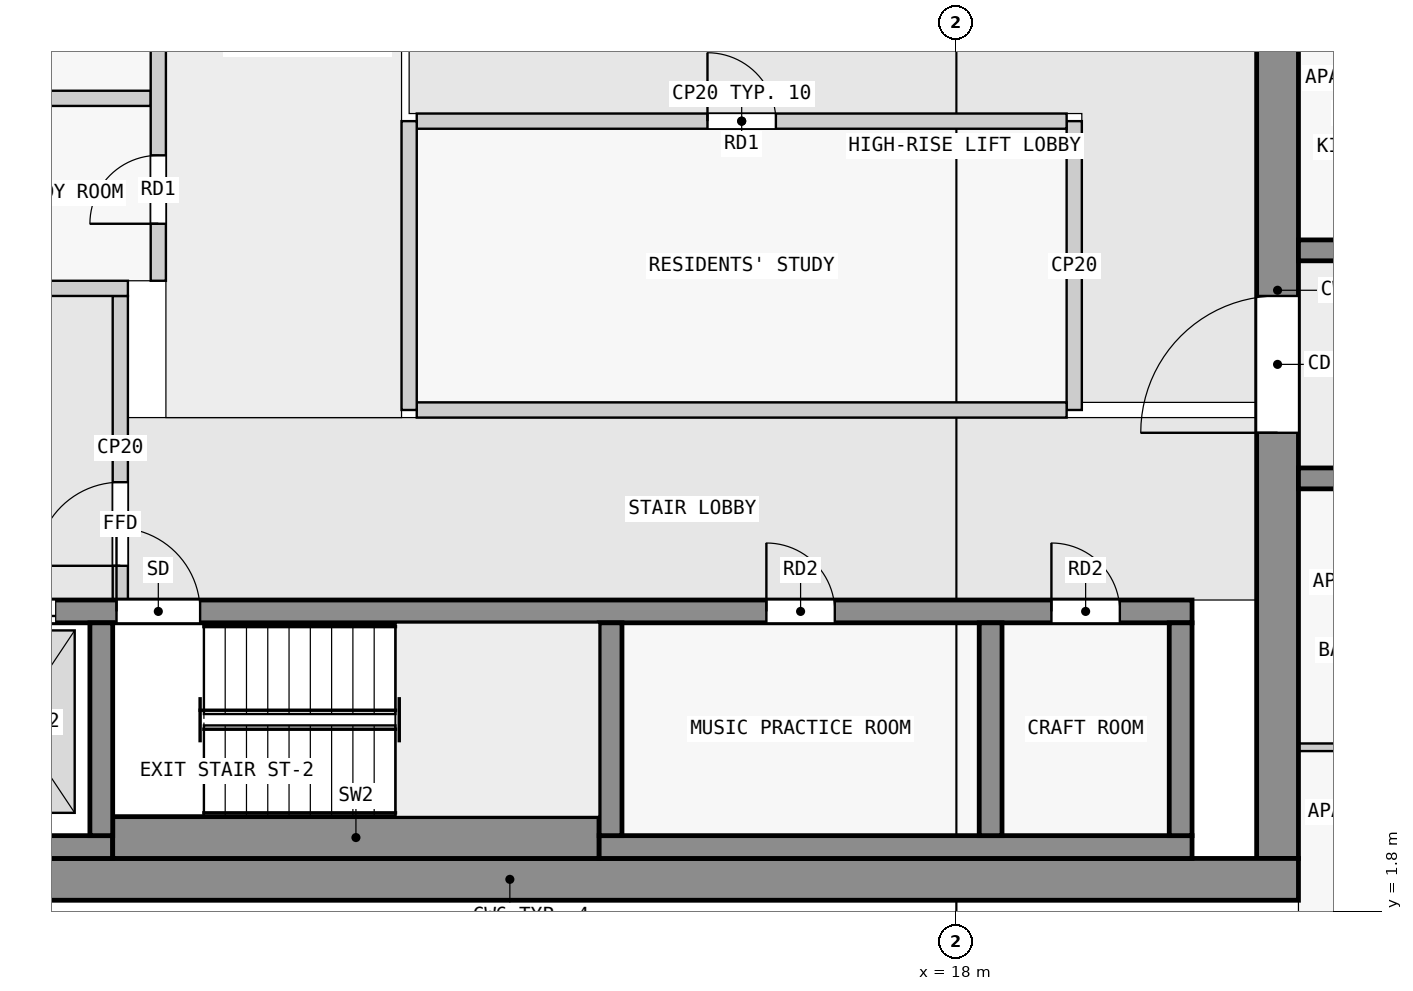
"""IFC4 building model, lengths in metres.
Left out: names, types, materials, properties, quantities, classifications, styles, units other than length and angle.
Written with IfcOpenShell. Run it as: python <this file> out.ifc"""

import sys

from ifc_helpers import new_model, si_unit, direction, frame, frame_2d, origin, place, context, subcontext, project, spatial, rectangle, extrude, element, fill, save


model = new_model("IFC4")
c1 = context("Model", 3, precision=1e-05, world=origin(), true_north=direction((0.0, 1.0)))
c2 = subcontext(c1, "Body", "Model", "MODEL_VIEW")
j1 = project(units=[si_unit("LENGTHUNIT", "METRE"), si_unit("PLANEANGLEUNIT", "RADIAN")], contexts=[c1])
p1 = place(None, origin())
s1 = spatial("IfcSite", under=j1, at=p1, CompositionType="ELEMENT")
p2 = place(p1, origin())
s2 = spatial("IfcBuilding", under=s1, at=p2, CompositionType="ELEMENT")
p3 = place(p2, frame((0.0, 0.0, 204.9)))
s3 = spatial("IfcBuildingStorey", under=s2, at=p3, CompositionType="ELEMENT", Elevation=204.9)
p4 = place(p3, frame((1.75, 2.225, 0.0), z_axis=(0.0, 0.0, 1.0), x_axis=(1.0, 0.0, 0.0)))
e1 = element("IfcWall", 1, at=p4, inside=s3, PredefinedType="SHEAR", context=c2, shape_type="SweptSolid", body=[
    extrude(rectangle(XDim=20.75, YDim=0.55, at=frame_2d((10.375, 0.0))), origin(), (0.0, 0.0, 1.0), 3.25),
])
p5 = place(p3, frame((22.225, 2.5, 0.0), z_axis=(0.0, 0.0, 1.0), x_axis=(0.0, 1.0, 0.0)))
e2 = element("IfcWall", 2, at=p5, inside=s3, PredefinedType="SHEAR", context=c2, shape_type="SweptSolid", body=[
    extrude(rectangle(XDim=14.95, YDim=0.55, at=frame_2d((7.475, 0.0))), origin(), (0.0, 0.0, 1.0), 3.25),
])
p6 = place(p5, frame((5.6, 0.0, 0.0)))
e3 = element("IfcOpeningElement", 3, at=p6, cuts=e2, PredefinedType="OPENING", context=c2, shape_type="SweptSolid", body=[
    extrude(rectangle(XDim=1.8, YDim=2.1, at=frame_2d((0.9, 1.05))), frame((0.0, 0.285, 0.0), z_axis=(0.0, -1.0, 0.0), x_axis=(1.0, 0.0, 0.0)), (0.0, 0.0, 1.0), 0.57),
])
p7 = place(p3, frame((2.3, 2.65, 0.0), z_axis=(0.0, 0.0, 1.0), x_axis=(1.0, 0.0, 0.0)))
e4 = element("IfcWall", 4, at=p7, inside=s3, PredefinedType="SHEAR", context=c2, shape_type="SweptSolid", body=[
    extrude(rectangle(XDim=4.6, YDim=0.3, at=frame_2d((2.3, 0.0))), origin(), (0.0, 0.0, 1.0), 3.25),
])
p8 = place(p3, frame((6.9, 2.775, 0.0), z_axis=(0.0, 0.0, 1.0), x_axis=(1.0, 0.0, 0.0)))
e5 = element("IfcWall", 5, at=p8, inside=s3, PredefinedType="SHEAR", context=c2, shape_type="SweptSolid", body=[
    extrude(rectangle(XDim=6.4, YDim=0.55, at=frame_2d((3.2, 0.0))), origin(), (0.0, 0.0, 1.0), 3.25),
])
p9 = place(p3, frame((13.3, 2.65, 0.0), z_axis=(0.0, 0.0, 1.0), x_axis=(1.0, 0.0, 0.0)))
e6 = element("IfcWall", 6, at=p9, inside=s3, PredefinedType="SHEAR", context=c2, shape_type="SweptSolid", body=[
    extrude(rectangle(XDim=7.8, YDim=0.3, at=frame_2d((3.9, 0.0))), origin(), (0.0, 0.0, 1.0), 3.25),
])
for number, where, z_axis, x_axis in (
    (7, (6.75, 2.8, 0.0), (0.0, 0.0, 1.0), (0.0, 1.0, 0.0)),
    (8, (13.45, 2.8, 0.0), (0.0, 0.0, 1.0), (0.0, 1.0, 0.0)),
    (9, (18.45, 2.8, 0.0), (0.0, 0.0, 1.0), (0.0, 1.0, 0.0)),
    (10, (20.95, 2.8, 0.0), (0.0, 0.0, 1.0), (0.0, 1.0, 0.0)),
):
    element("IfcWall", number, at=place(p3, frame(where, z_axis=z_axis, x_axis=x_axis)), inside=s3, PredefinedType="SHEAR", context=c2, shape_type="SweptSolid", body=[
        extrude(rectangle(XDim=2.8, YDim=0.3, at=frame_2d((1.4, 0.0))), origin(), (0.0, 0.0, 1.0), 3.25),
    ])
p10 = place(p3, frame((2.3, 5.75, 0.0), z_axis=(0.0, 0.0, 1.0), x_axis=(1.0, 0.0, 0.0)))
e11 = element("IfcWall", 11, at=p10, inside=s3, PredefinedType="SHEAR", context=c2, shape_type="SweptSolid", body=[
    extrude(rectangle(XDim=18.8, YDim=0.3, at=frame_2d((9.4, 0.0))), origin(), (0.0, 0.0, 1.0), 3.25),
])
p11 = place(p10, frame((4.65, 0.0, 0.0)))
e12 = element("IfcOpeningElement", 12, at=p11, cuts=e11, PredefinedType="OPENING", context=c2, shape_type="SweptSolid", body=[
    extrude(rectangle(XDim=1.1, YDim=2.1, at=frame_2d((0.55, 1.05))), frame((0.0, 0.16, 0.0), z_axis=(0.0, -1.0, 0.0), x_axis=(1.0, 0.0, 0.0)), (0.0, 0.0, 1.0), 0.32),
])
p12 = place(p10, frame((0.45, 0.0, 0.0)))
e13 = element("IfcOpeningElement", 13, at=p12, cuts=e11, PredefinedType="OPENING", context=c2, shape_type="SweptSolid", body=[
    extrude(rectangle(XDim=1.1, YDim=2.1, at=frame_2d((0.55, 1.05))), frame((0.0, 0.16, 0.0), z_axis=(0.0, -1.0, 0.0), x_axis=(1.0, 0.0, 0.0)), (0.0, 0.0, 1.0), 0.32),
])
p13 = place(p10, frame((2.75, 0.0, 0.0)))
e14 = element("IfcOpeningElement", 14, at=p13, cuts=e11, PredefinedType="OPENING", context=c2, shape_type="SweptSolid", body=[
    extrude(rectangle(XDim=1.1, YDim=2.1, at=frame_2d((0.55, 1.05))), frame((0.0, 0.16, 0.0), z_axis=(0.0, -1.0, 0.0), x_axis=(1.0, 0.0, 0.0)), (0.0, 0.0, 1.0), 0.32),
])
p14 = place(p10, frame((13.2, 0.0, 0.0)))
e15 = element("IfcOpeningElement", 15, at=p14, cuts=e11, PredefinedType="OPENING", context=c2, shape_type="SweptSolid", body=[
    extrude(rectangle(XDim=0.9, YDim=2.1, at=frame_2d((0.45, 1.05))), frame((0.0, 0.16, 0.0), z_axis=(0.0, -1.0, 0.0), x_axis=(1.0, 0.0, 0.0)), (0.0, 0.0, 1.0), 0.32),
])
p15 = place(p10, frame((16.95, 0.0, 0.0)))
e16 = element("IfcOpeningElement", 16, at=p15, cuts=e11, PredefinedType="OPENING", context=c2, shape_type="SweptSolid", body=[
    extrude(rectangle(XDim=0.9, YDim=2.1, at=frame_2d((0.45, 1.05))), frame((0.0, 0.16, 0.0), z_axis=(0.0, -1.0, 0.0), x_axis=(1.0, 0.0, 0.0)), (0.0, 0.0, 1.0), 0.32),
])
p16 = place(p3, frame((22.5, 7.5, 0.0), z_axis=(0.0, 0.0, 1.0), x_axis=(1.0, 0.0, 0.0)))
e17 = element("IfcWall", 17, at=p16, inside=s3, PredefinedType="SHEAR", context=c2, shape_type="SweptSolid", body=[
    extrude(rectangle(XDim=22.5, YDim=0.275, at=frame_2d((11.25, 0.0))), origin(), (0.0, 0.0, 1.0), 3.25),
])
p17 = place(p16, frame((4.05, 0.0, 0.0)))
e18 = element("IfcOpeningElement", 18, at=p17, cuts=e17, PredefinedType="OPENING", context=c2, shape_type="SweptSolid", body=[
    extrude(rectangle(XDim=1.0, YDim=2.1, at=frame_2d((0.5, 1.05))), frame((0.0, 0.147, 0.0), z_axis=(0.0, -1.0, 0.0), x_axis=(1.0, 0.0, 0.0)), (0.0, 0.0, 1.0), 0.295),
])
p18 = place(p16, frame((10.35, 0.0, 0.0)))
e19 = element("IfcOpeningElement", 19, at=p18, cuts=e17, PredefinedType="OPENING", context=c2, shape_type="SweptSolid", body=[
    extrude(rectangle(XDim=1.8, YDim=2.1, at=frame_2d((0.9, 1.05))), frame((0.0, 0.147, 0.0), z_axis=(0.0, -1.0, 0.0), x_axis=(1.0, 0.0, 0.0)), (0.0, 0.0, 1.0), 0.295),
])
p19 = place(p16, frame((16.85, 0.0, 0.0)))
e20 = element("IfcOpeningElement", 20, at=p19, cuts=e17, PredefinedType="OPENING", context=c2, shape_type="SweptSolid", body=[
    extrude(rectangle(XDim=1.0, YDim=2.1, at=frame_2d((0.5, 1.05))), frame((0.0, 0.147, 0.0), z_axis=(0.0, -1.0, 0.0), x_axis=(1.0, 0.0, 0.0)), (0.0, 0.0, 1.0), 0.295),
])
p20 = place(p3, frame((22.5, 10.5, 0.0), z_axis=(0.0, 0.0, 1.0), x_axis=(1.0, 0.0, 0.0)))
e21 = element("IfcWall", 21, at=p20, inside=s3, PredefinedType="SHEAR", context=c2, shape_type="SweptSolid", body=[
    extrude(rectangle(XDim=22.5, YDim=0.275, at=frame_2d((11.25, 0.0))), origin(), (0.0, 0.0, 1.0), 3.25),
])
p21 = place(p20, frame((7.75, 0.0, 0.0)))
e22 = element("IfcOpeningElement", 22, at=p21, cuts=e21, PredefinedType="OPENING", context=c2, shape_type="SweptSolid", body=[
    extrude(rectangle(XDim=1.0, YDim=2.1, at=frame_2d((0.5, 1.05))), frame((0.0, 0.147, 0.0), z_axis=(0.0, -1.0, 0.0), x_axis=(1.0, 0.0, 0.0)), (0.0, 0.0, 1.0), 0.295),
])
p22 = place(p20, frame((18.75, 0.0, 0.0)))
e23 = element("IfcOpeningElement", 23, at=p22, cuts=e21, PredefinedType="OPENING", context=c2, shape_type="SweptSolid", body=[
    extrude(rectangle(XDim=0.9, YDim=2.1, at=frame_2d((0.45, 1.05))), frame((0.0, 0.147, 0.0), z_axis=(0.0, -1.0, 0.0), x_axis=(1.0, 0.0, 0.0)), (0.0, 0.0, 1.0), 0.295),
])
p23 = place(p20, frame((20.95, 0.0, 0.0)))
e24 = element("IfcOpeningElement", 24, at=p23, cuts=e21, PredefinedType="OPENING", context=c2, shape_type="SweptSolid", body=[
    extrude(rectangle(XDim=1.0, YDim=2.1, at=frame_2d((0.5, 1.05))), frame((0.0, 0.147, 0.0), z_axis=(0.0, -1.0, 0.0), x_axis=(1.0, 0.0, 0.0)), (0.0, 0.0, 1.0), 0.295),
])
p24 = place(p3, frame((7.0, 5.9, 0.0), z_axis=(0.0, 0.0, 1.0), x_axis=(0.0, 1.0, 0.0)))
e25 = element("IfcWall", 25, at=p24, inside=s3, PredefinedType="PARTITIONING", context=c2, shape_type="SweptSolid", body=[
    extrude(rectangle(XDim=4.0, YDim=0.2, at=frame_2d((2.0, 0.0))), origin(), (0.0, 0.0, 1.0), 3.25),
])
p25 = place(p24, frame((0.45, 0.0, 0.0)))
e26 = element("IfcOpeningElement", 26, at=p25, cuts=e25, PredefinedType="OPENING", context=c2, shape_type="SweptSolid", body=[
    extrude(rectangle(XDim=1.1, YDim=2.1, at=frame_2d((0.55, 1.05))), frame((0.0, 0.11, 0.0), z_axis=(0.0, -1.0, 0.0), x_axis=(1.0, 0.0, 0.0)), (0.0, 0.0, 1.0), 0.22),
])
p26 = place(p3, frame((5.15, 10.0, 0.0), z_axis=(0.0, 0.0, 1.0), x_axis=(1.0, 0.0, 0.0)))
e27 = element("IfcWall", 27, at=p26, inside=s3, PredefinedType="PARTITIONING", context=c2, shape_type="SweptSolid", body=[
    extrude(rectangle(XDim=1.95, YDim=0.2, at=frame_2d((0.975, 0.0))), origin(), (0.0, 0.0, 1.0), 3.25),
])
p27 = place(p3, frame((10.8, 8.4, 0.0), z_axis=(0.0, 0.0, 1.0), x_axis=(0.0, 1.0, 0.0)))
e28 = element("IfcWall", 28, at=p27, inside=s3, PredefinedType="PARTITIONING", context=c2, shape_type="SweptSolid", body=[
    extrude(rectangle(XDim=3.8, YDim=0.2, at=frame_2d((1.9, 0.0))), origin(), (0.0, 0.0, 1.0), 3.25),
])
p28 = place(p3, frame((10.9, 8.4, 0.0), z_axis=(0.0, 0.0, 1.0), x_axis=(1.0, 0.0, 0.0)))
e29 = element("IfcWall", 29, at=p28, inside=s3, PredefinedType="PARTITIONING", context=c2, shape_type="SweptSolid", body=[
    extrude(rectangle(XDim=8.55, YDim=0.2, at=frame_2d((4.275, 0.0))), origin(), (0.0, 0.0, 1.0), 3.25),
])
p29 = place(p3, frame((19.55, 8.4, 0.0), z_axis=(0.0, 0.0, 1.0), x_axis=(0.0, 1.0, 0.0)))
e30 = element("IfcWall", 30, at=p29, inside=s3, PredefinedType="PARTITIONING", context=c2, shape_type="SweptSolid", body=[
    extrude(rectangle(XDim=3.8, YDim=0.2, at=frame_2d((1.9, 0.0))), origin(), (0.0, 0.0, 1.0), 3.25),
])
p30 = place(p3, frame((10.9, 12.2, 0.0), z_axis=(0.0, 0.0, 1.0), x_axis=(1.0, 0.0, 0.0)))
e31 = element("IfcWall", 31, at=p30, inside=s3, PredefinedType="PARTITIONING", context=c2, shape_type="SweptSolid", body=[
    extrude(rectangle(XDim=8.55, YDim=0.2, at=frame_2d((4.275, 0.0))), origin(), (0.0, 0.0, 1.0), 3.25),
])
p31 = place(p30, frame((3.825, 0.0, 0.0)))
e32 = element("IfcOpeningElement", 32, at=p31, cuts=e31, PredefinedType="OPENING", context=c2, shape_type="SweptSolid", body=[
    extrude(rectangle(XDim=0.9, YDim=2.1, at=frame_2d((0.45, 1.05))), frame((0.0, 0.11, 0.0), z_axis=(0.0, -1.0, 0.0), x_axis=(1.0, 0.0, 0.0)), (0.0, 0.0, 1.0), 0.22),
])
p32 = place(p3, frame((7.5, 10.1, 0.0), z_axis=(0.0, 0.0, 1.0), x_axis=(0.0, 1.0, 0.0)))
e33 = element("IfcWall", 33, at=p32, inside=s3, PredefinedType="PARTITIONING", context=c2, shape_type="SweptSolid", body=[
    extrude(rectangle(XDim=7.35, YDim=0.2, at=frame_2d((3.675, 0.0))), origin(), (0.0, 0.0, 1.0), 3.25),
])
p33 = place(p32, frame((0.75, 0.0, 0.0)))
e34 = element("IfcOpeningElement", 34, at=p33, cuts=e33, PredefinedType="OPENING", context=c2, shape_type="SweptSolid", body=[
    extrude(rectangle(XDim=0.9, YDim=2.1, at=frame_2d((0.45, 1.05))), frame((0.0, 0.11, 0.0), z_axis=(0.0, -1.0, 0.0), x_axis=(1.0, 0.0, 0.0)), (0.0, 0.0, 1.0), 0.22),
])
p34 = place(p32, frame((4.425, 0.0, 0.0)))
e35 = element("IfcOpeningElement", 35, at=p34, cuts=e33, PredefinedType="OPENING", context=c2, shape_type="SweptSolid", body=[
    extrude(rectangle(XDim=0.9, YDim=2.1, at=frame_2d((0.45, 1.05))), frame((0.0, 0.11, 0.0), z_axis=(0.0, -1.0, 0.0), x_axis=(1.0, 0.0, 0.0)), (0.0, 0.0, 1.0), 0.22),
])
p35 = place(p3, frame((5.15, 12.5, 0.0), z_axis=(0.0, 0.0, 1.0), x_axis=(1.0, 0.0, 0.0)))
e36 = element("IfcWall", 36, at=p35, inside=s3, PredefinedType="PARTITIONING", context=c2, shape_type="SweptSolid", body=[
    extrude(rectangle(XDim=2.25, YDim=0.2, at=frame_2d((1.125, 0.0))), origin(), (0.0, 0.0, 1.0), 3.25),
])
p36 = place(p3, frame((22.5, 3.962, 0.0), z_axis=(0.0, 0.0, 1.0), x_axis=(1.0, 0.0, 0.0)))
e37 = element("IfcWall", 37, at=p36, inside=s3, PredefinedType="PARTITIONING", context=c2, shape_type="SweptSolid", body=[
    extrude(rectangle(XDim=1.75, YDim=0.1, at=frame_2d((0.875, 0.0))), origin(), (0.0, 0.0, 1.0), 3.25),
])
p37 = place(p25, origin())
e38 = element("IfcDoor", 38, at=p37, inside=s3, OperationType="SINGLE_SWING_LEFT", PredefinedType="DOOR", context=c2, shape_type="SweptSolid", body=[
    extrude(rectangle(XDim=1.1, YDim=2.1, at=frame_2d((0.55, 1.05))), frame((0.0, 0.025, 0.0), z_axis=(0.0, -1.0, 0.0), x_axis=(1.0, 0.0, 0.0)), (0.0, 0.0, 1.0), 0.05),
])
fill(e26, e38)
p38 = place(p31, origin())
e39 = element("IfcDoor", 39, at=p38, inside=s3, OperationType="SINGLE_SWING_LEFT", PredefinedType="DOOR", context=c2, shape_type="SweptSolid", body=[
    extrude(rectangle(XDim=0.9, YDim=2.1, at=frame_2d((0.45, 1.05))), frame((0.0, 0.025, 0.0), z_axis=(0.0, -1.0, 0.0), x_axis=(1.0, 0.0, 0.0)), (0.0, 0.0, 1.0), 0.05),
])
fill(e32, e39)
p39 = place(p11, origin())
e40 = element("IfcDoor", 40, at=p39, inside=s3, OperationType="SINGLE_SWING_LEFT", PredefinedType="DOOR", context=c2, shape_type="SweptSolid", body=[
    extrude(rectangle(XDim=1.1, YDim=2.1, at=frame_2d((0.55, 1.05))), frame((0.0, 0.025, 0.0), z_axis=(0.0, -1.0, 0.0), x_axis=(1.0, 0.0, 0.0)), (0.0, 0.0, 1.0), 0.05),
])
fill(e12, e40)
p40 = place(p13, origin())
e41 = element("IfcDoor", 41, at=p40, inside=s3, OperationType="DOUBLE_DOOR_SLIDING", PredefinedType="DOOR", context=c2, shape_type="SweptSolid", body=[
    extrude(rectangle(XDim=1.1, YDim=2.1, at=frame_2d((0.55, 1.05))), frame((0.0, 0.025, 0.0), z_axis=(0.0, -1.0, 0.0), x_axis=(1.0, 0.0, 0.0)), (0.0, 0.0, 1.0), 0.05),
])
fill(e14, e41)
p41 = place(p6, origin())
e42 = element("IfcDoor", 42, at=p41, inside=s3, OperationType="DOUBLE_DOOR_SINGLE_SWING", PredefinedType="DOOR", context=c2, shape_type="SweptSolid", body=[
    extrude(rectangle(XDim=1.8, YDim=2.1, at=frame_2d((0.9, 1.05))), frame((0.0, 0.025, 0.0), z_axis=(0.0, -1.0, 0.0), x_axis=(1.0, 0.0, 0.0)), (0.0, 0.0, 1.0), 0.05),
])
fill(e3, e42)
p42 = place(p33, origin())
e43 = element("IfcDoor", 43, at=p42, inside=s3, OperationType="SINGLE_SWING_RIGHT", PredefinedType="DOOR", context=c2, shape_type="SweptSolid", body=[
    extrude(rectangle(XDim=0.9, YDim=2.1, at=frame_2d((0.45, 1.05))), frame((0.0, 0.025, 0.0), z_axis=(0.0, -1.0, 0.0), x_axis=(1.0, 0.0, 0.0)), (0.0, 0.0, 1.0), 0.05),
])
fill(e34, e43)
p43 = place(p14, origin())
e44 = element("IfcDoor", 44, at=p43, inside=s3, OperationType="SINGLE_SWING_LEFT", PredefinedType="DOOR", context=c2, shape_type="SweptSolid", body=[
    extrude(rectangle(XDim=0.9, YDim=2.1, at=frame_2d((0.45, 1.05))), frame((0.0, 0.025, 0.0), z_axis=(0.0, -1.0, 0.0), x_axis=(1.0, 0.0, 0.0)), (0.0, 0.0, 1.0), 0.05),
])
fill(e15, e44)
p44 = place(p15, origin())
e45 = element("IfcDoor", 45, at=p44, inside=s3, OperationType="SINGLE_SWING_LEFT", PredefinedType="DOOR", context=c2, shape_type="SweptSolid", body=[
    extrude(rectangle(XDim=0.9, YDim=2.1, at=frame_2d((0.45, 1.05))), frame((0.0, 0.025, 0.0), z_axis=(0.0, -1.0, 0.0), x_axis=(1.0, 0.0, 0.0)), (0.0, 0.0, 1.0), 0.05),
])
fill(e16, e45)
save(model, sys.argv[1])
